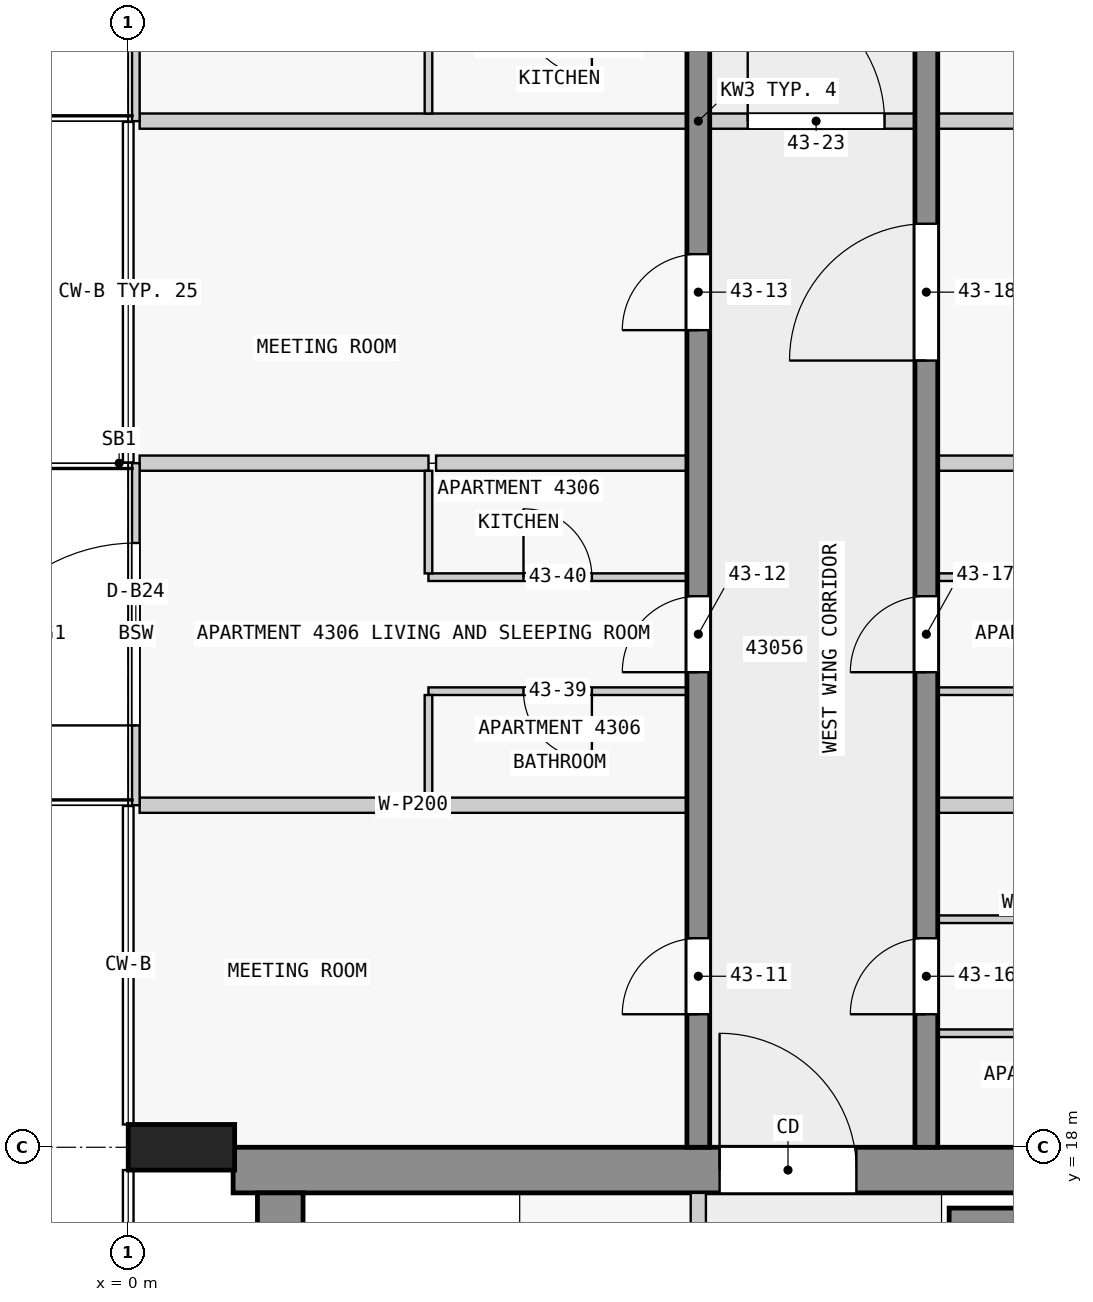
"""IFC4 building model, lengths in metres.
Left out: names, types, materials, properties, quantities, classifications, styles, units other than length and angle.
Written with IfcOpenShell. Run it as: python <this file> out.ifc"""

import sys

from ifc_helpers import new_model, si_unit, direction, frame, frame_2d, origin, origin_2d, place, context, subcontext, project, spatial, rectangle, extrude, element, fill, save


model = new_model("IFC4")
c1 = context("Model", 3, precision=1e-05, world=origin(), true_north=direction((0.0, 1.0)))
c2 = subcontext(c1, "Body", "Model", "MODEL_VIEW")
j1 = project(units=[si_unit("LENGTHUNIT", "METRE"), si_unit("PLANEANGLEUNIT", "RADIAN")], contexts=[c1])
p1 = place(None, origin())
s1 = spatial("IfcSite", under=j1, at=p1, CompositionType="ELEMENT")
p2 = place(p1, origin())
s2 = spatial("IfcBuilding", under=s1, at=p2, CompositionType="ELEMENT")
p3 = place(p2, frame((0.0, 0.0, 167.4)))
s3 = spatial("IfcBuildingStorey", under=s2, at=p3, CompositionType="ELEMENT", Elevation=167.4)
p4 = place(p3, frame((0.7, 18.0, 0.0), z_axis=(0.0, 0.0, 1.0), x_axis=(0.0, 1.0, 0.0)))
e1 = element("IfcColumn", 1, at=p4, inside=s3, PredefinedType="COLUMN", context=c2, shape_type="SweptSolid", body=[
    extrude(rectangle(XDim=0.6, YDim=1.4, at=origin_2d()), origin(), (0.0, 0.0, 1.0), 3.5),
])
p5 = place(p3, frame((1.38, 17.7, 0.0), z_axis=(0.0, 0.0, 1.0), x_axis=(1.0, 0.0, 0.0)))
e2 = element("IfcWall", 2, at=p5, inside=s3, PredefinedType="SHEAR", context=c2, shape_type="SweptSolid", body=[
    extrude(rectangle(XDim=21.12, YDim=0.6, at=frame_2d((10.56, 0.0))), origin(), (0.0, 0.0, 1.0), 3.25),
])
p6 = place(p5, frame((6.4, 0.0, 0.0)))
e3 = element("IfcOpeningElement", 3, at=p6, cuts=e2, PredefinedType="OPENING", context=c2, shape_type="SweptSolid", body=[
    extrude(rectangle(XDim=1.8, YDim=2.1, at=frame_2d((0.9, 1.05))), frame((0.0, 0.31, 0.0), z_axis=(0.0, -1.0, 0.0), x_axis=(1.0, 0.0, 0.0)), (0.0, 0.0, 1.0), 0.62),
])
p7 = place(p3, frame((2.0, 2.5, 0.0), z_axis=(0.0, 0.0, 1.0), x_axis=(0.0, 1.0, 0.0)))
e4 = element("IfcWall", 4, at=p7, inside=s3, PredefinedType="SHEAR", context=c2, shape_type="SweptSolid", body=[
    extrude(rectangle(XDim=14.9, YDim=0.6, at=frame_2d((7.45, 0.0))), origin(), (0.0, 0.0, 1.0), 3.25),
])
p8 = place(p3, frame((10.8, 17.05, 0.0), z_axis=(0.0, 0.0, 1.0), x_axis=(1.0, 0.0, 0.0)))
e5 = element("IfcWall", 5, at=p8, inside=s3, PredefinedType="SHEAR", context=c2, shape_type="SweptSolid", body=[
    extrude(rectangle(XDim=7.8, YDim=0.3, at=frame_2d((3.9, 0.0))), origin(), (0.0, 0.0, 1.0), 3.25),
])
p9 = place(p3, frame((7.5, 18.0, 0.0), z_axis=(0.0, 0.0, 1.0), x_axis=(0.0, 1.0, 0.0)))
e6 = element("IfcWall", 6, at=p9, inside=s3, PredefinedType="SHEAR", context=c2, shape_type="SweptSolid", body=[
    extrude(rectangle(XDim=27.0, YDim=0.3, at=frame_2d((13.5, 0.0))), origin(), (0.0, 0.0, 1.0), 3.25),
])
p10 = place(p9, frame((1.75, 0.0, 0.0)))
e7 = element("IfcOpeningElement", 7, at=p10, cuts=e6, PredefinedType="OPENING", context=c2, shape_type="SweptSolid", body=[
    extrude(rectangle(XDim=1.0, YDim=2.1, at=frame_2d((0.5, 1.05))), frame((0.0, 0.16, 0.0), z_axis=(0.0, -1.0, 0.0), x_axis=(1.0, 0.0, 0.0)), (0.0, 0.0, 1.0), 0.32),
])
p11 = place(p9, frame((6.25, 0.0, 0.0)))
e8 = element("IfcOpeningElement", 8, at=p11, cuts=e6, PredefinedType="OPENING", context=c2, shape_type="SweptSolid", body=[
    extrude(rectangle(XDim=1.0, YDim=2.1, at=frame_2d((0.5, 1.05))), frame((0.0, 0.16, 0.0), z_axis=(0.0, -1.0, 0.0), x_axis=(1.0, 0.0, 0.0)), (0.0, 0.0, 1.0), 0.32),
])
p12 = place(p9, frame((10.75, 0.0, 0.0)))
e9 = element("IfcOpeningElement", 9, at=p12, cuts=e6, PredefinedType="OPENING", context=c2, shape_type="SweptSolid", body=[
    extrude(rectangle(XDim=1.0, YDim=2.1, at=frame_2d((0.5, 1.05))), frame((0.0, 0.16, 0.0), z_axis=(0.0, -1.0, 0.0), x_axis=(1.0, 0.0, 0.0)), (0.0, 0.0, 1.0), 0.32),
])
p13 = place(p9, frame((15.25, 0.0, 0.0)))
e10 = element("IfcOpeningElement", 10, at=p13, cuts=e6, PredefinedType="OPENING", context=c2, shape_type="SweptSolid", body=[
    extrude(rectangle(XDim=1.0, YDim=2.1, at=frame_2d((0.5, 1.05))), frame((0.0, 0.16, 0.0), z_axis=(0.0, -1.0, 0.0), x_axis=(1.0, 0.0, 0.0)), (0.0, 0.0, 1.0), 0.32),
])
p14 = place(p9, frame((21.35, 0.0, 0.0)))
e11 = element("IfcOpeningElement", 11, at=p14, cuts=e6, PredefinedType="OPENING", context=c2, shape_type="SweptSolid", body=[
    extrude(rectangle(XDim=1.0, YDim=2.1, at=frame_2d((0.5, 1.05))), frame((0.0, 0.16, 0.0), z_axis=(0.0, -1.0, 0.0), x_axis=(1.0, 0.0, 0.0)), (0.0, 0.0, 1.0), 0.32),
])
p15 = place(p3, frame((10.5, 18.0, 0.0), z_axis=(0.0, 0.0, 1.0), x_axis=(0.0, 1.0, 0.0)))
e12 = element("IfcWall", 12, at=p15, inside=s3, PredefinedType="SHEAR", context=c2, shape_type="SweptSolid", body=[
    extrude(rectangle(XDim=27.0, YDim=0.3, at=frame_2d((13.5, 0.0))), origin(), (0.0, 0.0, 1.0), 3.25),
])
p16 = place(p15, frame((1.75, 0.0, 0.0)))
e13 = element("IfcOpeningElement", 13, at=p16, cuts=e12, PredefinedType="OPENING", context=c2, shape_type="SweptSolid", body=[
    extrude(rectangle(XDim=1.0, YDim=2.1, at=frame_2d((0.5, 1.05))), frame((0.0, 0.16, 0.0), z_axis=(0.0, -1.0, 0.0), x_axis=(1.0, 0.0, 0.0)), (0.0, 0.0, 1.0), 0.32),
])
p17 = place(p15, frame((6.25, 0.0, 0.0)))
e14 = element("IfcOpeningElement", 14, at=p17, cuts=e12, PredefinedType="OPENING", context=c2, shape_type="SweptSolid", body=[
    extrude(rectangle(XDim=1.0, YDim=2.1, at=frame_2d((0.5, 1.05))), frame((0.0, 0.16, 0.0), z_axis=(0.0, -1.0, 0.0), x_axis=(1.0, 0.0, 0.0)), (0.0, 0.0, 1.0), 0.32),
])
p18 = place(p15, frame((10.35, 0.0, 0.0)))
e15 = element("IfcOpeningElement", 15, at=p18, cuts=e12, PredefinedType="OPENING", context=c2, shape_type="SweptSolid", body=[
    extrude(rectangle(XDim=1.8, YDim=2.1, at=frame_2d((0.9, 1.05))), frame((0.0, 0.16, 0.0), z_axis=(0.0, -1.0, 0.0), x_axis=(1.0, 0.0, 0.0)), (0.0, 0.0, 1.0), 0.32),
])
p19 = place(p15, frame((17.55, 0.0, 0.0)))
e16 = element("IfcOpeningElement", 16, at=p19, cuts=e12, PredefinedType="OPENING", context=c2, shape_type="SweptSolid", body=[
    extrude(rectangle(XDim=1.0, YDim=2.1, at=frame_2d((0.5, 1.05))), frame((0.0, 0.16, 0.0), z_axis=(0.0, -1.0, 0.0), x_axis=(1.0, 0.0, 0.0)), (0.0, 0.0, 1.0), 0.32),
])
p20 = place(p15, frame((23.25, 0.0, 0.0)))
e17 = element("IfcOpeningElement", 17, at=p20, cuts=e12, PredefinedType="OPENING", context=c2, shape_type="SweptSolid", body=[
    extrude(rectangle(XDim=0.9, YDim=2.1, at=frame_2d((0.45, 1.05))), frame((0.0, 0.16, 0.0), z_axis=(0.0, -1.0, 0.0), x_axis=(1.0, 0.0, 0.0)), (0.0, 0.0, 1.0), 0.32),
])
p21 = place(p15, frame((25.45, 0.0, 0.0)))
e18 = element("IfcOpeningElement", 18, at=p21, cuts=e12, PredefinedType="OPENING", context=c2, shape_type="SweptSolid", body=[
    extrude(rectangle(XDim=1.0, YDim=2.1, at=frame_2d((0.5, 1.05))), frame((0.0, 0.16, 0.0), z_axis=(0.0, -1.0, 0.0), x_axis=(1.0, 0.0, 0.0)), (0.0, 0.0, 1.0), 0.32),
])
p22 = place(p3, frame((0.1, 22.5, 0.0), z_axis=(0.0, 0.0, 1.0), x_axis=(0.0, 1.0, 0.0)))
e19 = element("IfcWall", 19, at=p22, inside=s3, PredefinedType="STANDARD", context=c2, shape_type="SweptSolid", body=[
    extrude(rectangle(XDim=4.5, YDim=0.1, at=frame_2d((2.25, 0.0))), origin(), (0.0, 0.0, 1.0), 3.25),
])
p23 = place(p22, frame((1.05, 0.0, 0.0)))
e20 = element("IfcOpeningElement", 20, at=p23, cuts=e19, PredefinedType="OPENING", context=c2, shape_type="SweptSolid", body=[
    extrude(rectangle(XDim=2.4, YDim=2.4, at=frame_2d((1.2, 1.2))), frame((0.0, 0.06, 0.0), z_axis=(0.0, -1.0, 0.0), x_axis=(1.0, 0.0, 0.0)), (0.0, 0.0, 1.0), 0.12),
])
p24 = place(p3, frame((0.1, 31.5, 0.0), z_axis=(0.0, 0.0, 1.0), x_axis=(0.0, 1.0, 0.0)))
e21 = element("IfcWall", 21, at=p24, inside=s3, PredefinedType="STANDARD", context=c2, shape_type="SweptSolid", body=[
    extrude(rectangle(XDim=4.5, YDim=0.1, at=frame_2d((2.25, 0.0))), origin(), (0.0, 0.0, 1.0), 3.25),
])
p25 = place(p24, frame((1.05, 0.0, 0.0)))
e22 = element("IfcOpeningElement", 22, at=p25, cuts=e21, PredefinedType="OPENING", context=c2, shape_type="SweptSolid", body=[
    extrude(rectangle(XDim=2.4, YDim=2.4, at=frame_2d((1.2, 1.2))), frame((0.0, 0.06, 0.0), z_axis=(0.0, -1.0, 0.0), x_axis=(1.0, 0.0, 0.0)), (0.0, 0.0, 1.0), 0.12),
])
p26 = place(p3, frame((7.5, 10.1, 0.0), z_axis=(0.0, 0.0, 1.0), x_axis=(0.0, 1.0, 0.0)))
e23 = element("IfcWall", 23, at=p26, inside=s3, PredefinedType="PARTITIONING", context=c2, shape_type="SweptSolid", body=[
    extrude(rectangle(XDim=7.3, YDim=0.2, at=frame_2d((3.65, 0.0))), origin(), (0.0, 0.0, 1.0), 3.25),
])
p27 = place(p26, frame((1.05, 0.0, 0.0)))
e24 = element("IfcOpeningElement", 24, at=p27, cuts=e23, PredefinedType="OPENING", context=c2, shape_type="SweptSolid", body=[
    extrude(rectangle(XDim=0.9, YDim=2.1, at=frame_2d((0.45, 1.05))), frame((0.0, 0.11, 0.0), z_axis=(0.0, -1.0, 0.0), x_axis=(1.0, 0.0, 0.0)), (0.0, 0.0, 1.0), 0.22),
])
p28 = place(p26, frame((4.7, 0.0, 0.0)))
e25 = element("IfcOpeningElement", 25, at=p28, cuts=e23, PredefinedType="OPENING", context=c2, shape_type="SweptSolid", body=[
    extrude(rectangle(XDim=0.9, YDim=2.1, at=frame_2d((0.45, 1.05))), frame((0.0, 0.11, 0.0), z_axis=(0.0, -1.0, 0.0), x_axis=(1.0, 0.0, 0.0)), (0.0, 0.0, 1.0), 0.22),
])
p29 = place(p3, frame((14.05, 19.5, 0.0), z_axis=(0.0, 0.0, 1.0), x_axis=(-1.0, 0.0, 0.0)))
e26 = element("IfcWall", 26, at=p29, inside=s3, PredefinedType="PARTITIONING", context=c2, shape_type="SweptSolid", body=[
    extrude(rectangle(XDim=3.4, YDim=0.1, at=frame_2d((1.7, 0.0))), origin(), (0.0, 0.0, 1.0), 3.25),
])
p30 = place(p29, frame((1.25, 0.0, 0.0)))
e27 = element("IfcOpeningElement", 27, at=p30, cuts=e26, PredefinedType="OPENING", context=c2, shape_type="SweptSolid", body=[
    extrude(rectangle(XDim=0.9, YDim=2.1, at=frame_2d((0.45, 1.05))), frame((0.0, 0.06, 0.0), z_axis=(0.0, -1.0, 0.0), x_axis=(1.0, 0.0, 0.0)), (0.0, 0.0, 1.0), 0.12),
])
p31 = place(p3, frame((10.65, 21.0, 0.0), z_axis=(0.0, 0.0, 1.0), x_axis=(1.0, 0.0, 0.0)))
e28 = element("IfcWall", 28, at=p31, inside=s3, PredefinedType="PARTITIONING", context=c2, shape_type="SweptSolid", body=[
    extrude(rectangle(XDim=3.4, YDim=0.1, at=frame_2d((1.7, 0.0))), origin(), (0.0, 0.0, 1.0), 3.25),
])
p32 = place(p31, frame((1.25, 0.0, 0.0)))
e29 = element("IfcOpeningElement", 29, at=p32, cuts=e28, PredefinedType="OPENING", context=c2, shape_type="SweptSolid", body=[
    extrude(rectangle(XDim=0.9, YDim=2.1, at=frame_2d((0.45, 1.05))), frame((0.0, 0.06, 0.0), z_axis=(0.0, -1.0, 0.0), x_axis=(1.0, 0.0, 0.0)), (0.0, 0.0, 1.0), 0.12),
])
p33 = place(p3, frame((7.35, 22.5, 0.0), z_axis=(0.0, 0.0, 1.0), x_axis=(-1.0, 0.0, 0.0)))
e30 = element("IfcWall", 30, at=p33, inside=s3, PredefinedType="PARTITIONING", context=c2, shape_type="SweptSolid", body=[
    extrude(rectangle(XDim=7.2, YDim=0.2, at=frame_2d((3.6, 0.0))), origin(), (0.0, 0.0, 1.0), 3.25),
])
p34 = place(p3, frame((13.95, 22.5, 0.0), z_axis=(0.0, 0.0, 1.0), x_axis=(-1.0, 0.0, 0.0)))
e31 = element("IfcWall", 31, at=p34, inside=s3, PredefinedType="PARTITIONING", context=c2, shape_type="SweptSolid", body=[
    extrude(rectangle(XDim=3.3, YDim=0.2, at=frame_2d((1.65, 0.0))), origin(), (0.0, 0.0, 1.0), 3.25),
])
p35 = place(p3, frame((7.35, 24.0, 0.0), z_axis=(0.0, 0.0, 1.0), x_axis=(-1.0, 0.0, 0.0)))
e32 = element("IfcWall", 32, at=p35, inside=s3, PredefinedType="PARTITIONING", context=c2, shape_type="SweptSolid", body=[
    extrude(rectangle(XDim=3.4, YDim=0.1, at=frame_2d((1.7, 0.0))), origin(), (0.0, 0.0, 1.0), 3.25),
])
p36 = place(p35, frame((1.25, 0.0, 0.0)))
e33 = element("IfcOpeningElement", 33, at=p36, cuts=e32, PredefinedType="OPENING", context=c2, shape_type="SweptSolid", body=[
    extrude(rectangle(XDim=0.9, YDim=2.1, at=frame_2d((0.45, 1.05))), frame((0.0, 0.06, 0.0), z_axis=(0.0, -1.0, 0.0), x_axis=(1.0, 0.0, 0.0)), (0.0, 0.0, 1.0), 0.12),
])
p37 = place(p3, frame((14.05, 24.0, 0.0), z_axis=(0.0, 0.0, 1.0), x_axis=(-1.0, 0.0, 0.0)))
e34 = element("IfcWall", 34, at=p37, inside=s3, PredefinedType="PARTITIONING", context=c2, shape_type="SweptSolid", body=[
    extrude(rectangle(XDim=3.4, YDim=0.1, at=frame_2d((1.7, 0.0))), origin(), (0.0, 0.0, 1.0), 3.25),
])
p38 = place(p37, frame((1.25, 0.0, 0.0)))
e35 = element("IfcOpeningElement", 35, at=p38, cuts=e34, PredefinedType="OPENING", context=c2, shape_type="SweptSolid", body=[
    extrude(rectangle(XDim=0.9, YDim=2.1, at=frame_2d((0.45, 1.05))), frame((0.0, 0.06, 0.0), z_axis=(0.0, -1.0, 0.0), x_axis=(1.0, 0.0, 0.0)), (0.0, 0.0, 1.0), 0.12),
])
p39 = place(p3, frame((3.95, 25.5, 0.0), z_axis=(0.0, 0.0, 1.0), x_axis=(1.0, 0.0, 0.0)))
e36 = element("IfcWall", 36, at=p39, inside=s3, PredefinedType="PARTITIONING", context=c2, shape_type="SweptSolid", body=[
    extrude(rectangle(XDim=3.4, YDim=0.1, at=frame_2d((1.7, 0.0))), origin(), (0.0, 0.0, 1.0), 3.25),
])
p40 = place(p39, frame((1.25, 0.0, 0.0)))
e37 = element("IfcOpeningElement", 37, at=p40, cuts=e36, PredefinedType="OPENING", context=c2, shape_type="SweptSolid", body=[
    extrude(rectangle(XDim=0.9, YDim=2.1, at=frame_2d((0.45, 1.05))), frame((0.0, 0.06, 0.0), z_axis=(0.0, -1.0, 0.0), x_axis=(1.0, 0.0, 0.0)), (0.0, 0.0, 1.0), 0.12),
])
p41 = place(p3, frame((10.65, 25.5, 0.0), z_axis=(0.0, 0.0, 1.0), x_axis=(1.0, 0.0, 0.0)))
e38 = element("IfcWall", 38, at=p41, inside=s3, PredefinedType="PARTITIONING", context=c2, shape_type="SweptSolid", body=[
    extrude(rectangle(XDim=3.4, YDim=0.1, at=frame_2d((1.7, 0.0))), origin(), (0.0, 0.0, 1.0), 3.25),
])
p42 = place(p41, frame((1.25, 0.0, 0.0)))
e39 = element("IfcOpeningElement", 39, at=p42, cuts=e38, PredefinedType="OPENING", context=c2, shape_type="SweptSolid", body=[
    extrude(rectangle(XDim=0.9, YDim=2.1, at=frame_2d((0.45, 1.05))), frame((0.0, 0.06, 0.0), z_axis=(0.0, -1.0, 0.0), x_axis=(1.0, 0.0, 0.0)), (0.0, 0.0, 1.0), 0.12),
])
for number, where, z_axis, x_axis in (
    (40, (7.35, 27.0, 0.0), (0.0, 0.0, 1.0), (-1.0, 0.0, 0.0)),
    (41, (13.95, 27.0, 0.0), (0.0, 0.0, 1.0), (-1.0, 0.0, 0.0)),
):
    element("IfcWall", number, at=place(p3, frame(where, z_axis=z_axis, x_axis=x_axis)), inside=s3, PredefinedType="PARTITIONING", context=c2, shape_type="SweptSolid", body=[
        extrude(rectangle(XDim=3.3, YDim=0.2, at=frame_2d((1.65, 0.0))), origin(), (0.0, 0.0, 1.0), 3.25),
    ])
p43 = place(p3, frame((0.15, 27.0, 0.0), z_axis=(0.0, 0.0, 1.0), x_axis=(1.0, 0.0, 0.0)))
e42 = element("IfcWall", 42, at=p43, inside=s3, PredefinedType="PARTITIONING", context=c2, shape_type="SweptSolid", body=[
    extrude(rectangle(XDim=3.8, YDim=0.2, at=frame_2d((1.9, 0.0))), origin(), (0.0, 0.0, 1.0), 3.25),
])
for number, where, z_axis, x_axis in (
    (43, (7.35, 31.5, 0.0), (0.0, 0.0, 1.0), (-1.0, 0.0, 0.0)),
    (44, (17.85, 31.5, 0.0), (0.0, 0.0, 1.0), (-1.0, 0.0, 0.0)),
):
    element("IfcWall", number, at=place(p3, frame(where, z_axis=z_axis, x_axis=x_axis)), inside=s3, PredefinedType="PARTITIONING", context=c2, shape_type="SweptSolid", body=[
        extrude(rectangle(XDim=7.2, YDim=0.2, at=frame_2d((3.6, 0.0))), origin(), (0.0, 0.0, 1.0), 3.25),
    ])
for number, where, z_axis, x_axis in (
    (45, (3.95, 23.95, 0.0), (0.0, 0.0, 1.0), (0.0, -1.0, 0.0)),
    (46, (3.95, 26.9, 0.0), (0.0, 0.0, 1.0), (0.0, -1.0, 0.0)),
    (47, (3.95, 32.95, 0.0), (0.0, 0.0, 1.0), (0.0, -1.0, 0.0)),
):
    element("IfcWall", number, at=place(p3, frame(where, z_axis=z_axis, x_axis=x_axis)), inside=s3, PredefinedType="PARTITIONING", context=c2, shape_type="SweptSolid", body=[
        extrude(rectangle(XDim=1.35, YDim=0.1, at=frame_2d((0.675, 0.0))), origin(), (0.0, 0.0, 1.0), 3.25),
    ])
p44 = place(p3, frame((7.45, 31.5, 0.0), z_axis=(0.0, 0.0, 1.0), x_axis=(1.0, 0.0, 0.0)))
e48 = element("IfcWall", 48, at=p44, inside=s3, PredefinedType="PARTITIONING", context=c2, shape_type="SweptSolid", body=[
    extrude(rectangle(XDim=3.1, YDim=0.2, at=frame_2d((1.55, 0.0))), origin(), (0.0, 0.0, 1.0), 3.25),
])
p45 = place(p44, frame((0.7, 0.0, 0.0)))
e49 = element("IfcOpeningElement", 49, at=p45, cuts=e48, PredefinedType="OPENING", context=c2, shape_type="SweptSolid", body=[
    extrude(rectangle(XDim=1.8, YDim=2.1, at=frame_2d((0.9, 1.05))), frame((0.0, 0.11, 0.0), z_axis=(0.0, -1.0, 0.0), x_axis=(1.0, 0.0, 0.0)), (0.0, 0.0, 1.0), 0.22),
])
p46 = place(p23, origin())
e50 = element("IfcDoor", 50, at=p46, inside=s3, OperationType="SINGLE_SWING_LEFT", PredefinedType="DOOR", context=c2, shape_type="SweptSolid", body=[
    extrude(rectangle(XDim=2.4, YDim=2.4, at=frame_2d((1.2, 1.2))), frame((0.0, 0.025, 0.0), z_axis=(0.0, -1.0, 0.0), x_axis=(1.0, 0.0, 0.0)), (0.0, 0.0, 1.0), 0.05),
])
fill(e20, e50)
p47 = place(p6, origin())
e51 = element("IfcDoor", 51, at=p47, inside=s3, OperationType="DOUBLE_DOOR_SINGLE_SWING", PredefinedType="DOOR", context=c2, shape_type="SweptSolid", body=[
    extrude(rectangle(XDim=1.8, YDim=2.1, at=frame_2d((0.9, 1.05))), frame((0.0, 0.025, 0.0), z_axis=(0.0, -1.0, 0.0), x_axis=(1.0, 0.0, 0.0)), (0.0, 0.0, 1.0), 0.05),
])
fill(e3, e51)
p48 = place(p10, origin())
e52 = element("IfcDoor", 52, at=p48, inside=s3, OperationType="SINGLE_SWING_LEFT", PredefinedType="DOOR", context=c2, shape_type="SweptSolid", body=[
    extrude(rectangle(XDim=1.0, YDim=2.1, at=frame_2d((0.5, 1.05))), frame((0.0, 0.025, 0.0), z_axis=(0.0, -1.0, 0.0), x_axis=(1.0, 0.0, 0.0)), (0.0, 0.0, 1.0), 0.05),
])
fill(e7, e52)
p49 = place(p11, origin())
e53 = element("IfcDoor", 53, at=p49, inside=s3, OperationType="SINGLE_SWING_LEFT", PredefinedType="DOOR", context=c2, shape_type="SweptSolid", body=[
    extrude(rectangle(XDim=1.0, YDim=2.1, at=frame_2d((0.5, 1.05))), frame((0.0, 0.025, 0.0), z_axis=(0.0, -1.0, 0.0), x_axis=(1.0, 0.0, 0.0)), (0.0, 0.0, 1.0), 0.05),
])
fill(e8, e53)
p50 = place(p12, origin())
e54 = element("IfcDoor", 54, at=p50, inside=s3, OperationType="SINGLE_SWING_LEFT", PredefinedType="DOOR", context=c2, shape_type="SweptSolid", body=[
    extrude(rectangle(XDim=1.0, YDim=2.1, at=frame_2d((0.5, 1.05))), frame((0.0, 0.025, 0.0), z_axis=(0.0, -1.0, 0.0), x_axis=(1.0, 0.0, 0.0)), (0.0, 0.0, 1.0), 0.05),
])
fill(e9, e54)
p51 = place(p16, origin())
e55 = element("IfcDoor", 55, at=p51, inside=s3, OperationType="SINGLE_SWING_LEFT", PredefinedType="DOOR", context=c2, shape_type="SweptSolid", body=[
    extrude(rectangle(XDim=1.0, YDim=2.1, at=frame_2d((0.5, 1.05))), frame((0.0, 0.025, 0.0), z_axis=(0.0, -1.0, 0.0), x_axis=(1.0, 0.0, 0.0)), (0.0, 0.0, 1.0), 0.05),
])
fill(e13, e55)
p52 = place(p17, origin())
e56 = element("IfcDoor", 56, at=p52, inside=s3, OperationType="SINGLE_SWING_LEFT", PredefinedType="DOOR", context=c2, shape_type="SweptSolid", body=[
    extrude(rectangle(XDim=1.0, YDim=2.1, at=frame_2d((0.5, 1.05))), frame((0.0, 0.025, 0.0), z_axis=(0.0, -1.0, 0.0), x_axis=(1.0, 0.0, 0.0)), (0.0, 0.0, 1.0), 0.05),
])
fill(e14, e56)
p53 = place(p18, origin())
e57 = element("IfcDoor", 57, at=p53, inside=s3, OperationType="SINGLE_SWING_LEFT", PredefinedType="DOOR", context=c2, shape_type="SweptSolid", body=[
    extrude(rectangle(XDim=1.8, YDim=2.1, at=frame_2d((0.9, 1.05))), frame((0.0, 0.025, 0.0), z_axis=(0.0, -1.0, 0.0), x_axis=(1.0, 0.0, 0.0)), (0.0, 0.0, 1.0), 0.05),
])
fill(e15, e57)
p54 = place(p45, origin())
e58 = element("IfcDoor", 58, at=p54, inside=s3, OperationType="SINGLE_SWING_RIGHT", PredefinedType="DOOR", context=c2, shape_type="SweptSolid", body=[
    extrude(rectangle(XDim=1.8, YDim=2.1, at=frame_2d((0.9, 1.05))), frame((0.0, 0.025, 0.0), z_axis=(0.0, -1.0, 0.0), x_axis=(1.0, 0.0, 0.0)), (0.0, 0.0, 1.0), 0.05),
])
fill(e49, e58)
p55 = place(p36, origin())
e59 = element("IfcDoor", 59, at=p55, inside=s3, OperationType="SINGLE_SWING_RIGHT", PredefinedType="DOOR", context=c2, shape_type="SweptSolid", body=[
    extrude(rectangle(XDim=0.9, YDim=2.1, at=frame_2d((0.45, 1.05))), frame((0.0, 0.025, 0.0), z_axis=(0.0, -1.0, 0.0), x_axis=(1.0, 0.0, 0.0)), (0.0, 0.0, 1.0), 0.05),
])
fill(e33, e59)
p56 = place(p40, origin())
e60 = element("IfcDoor", 60, at=p56, inside=s3, OperationType="SINGLE_SWING_RIGHT", PredefinedType="DOOR", context=c2, shape_type="SweptSolid", body=[
    extrude(rectangle(XDim=0.9, YDim=2.1, at=frame_2d((0.45, 1.05))), frame((0.0, 0.025, 0.0), z_axis=(0.0, -1.0, 0.0), x_axis=(1.0, 0.0, 0.0)), (0.0, 0.0, 1.0), 0.05),
])
fill(e37, e60)
save(model, sys.argv[1])
